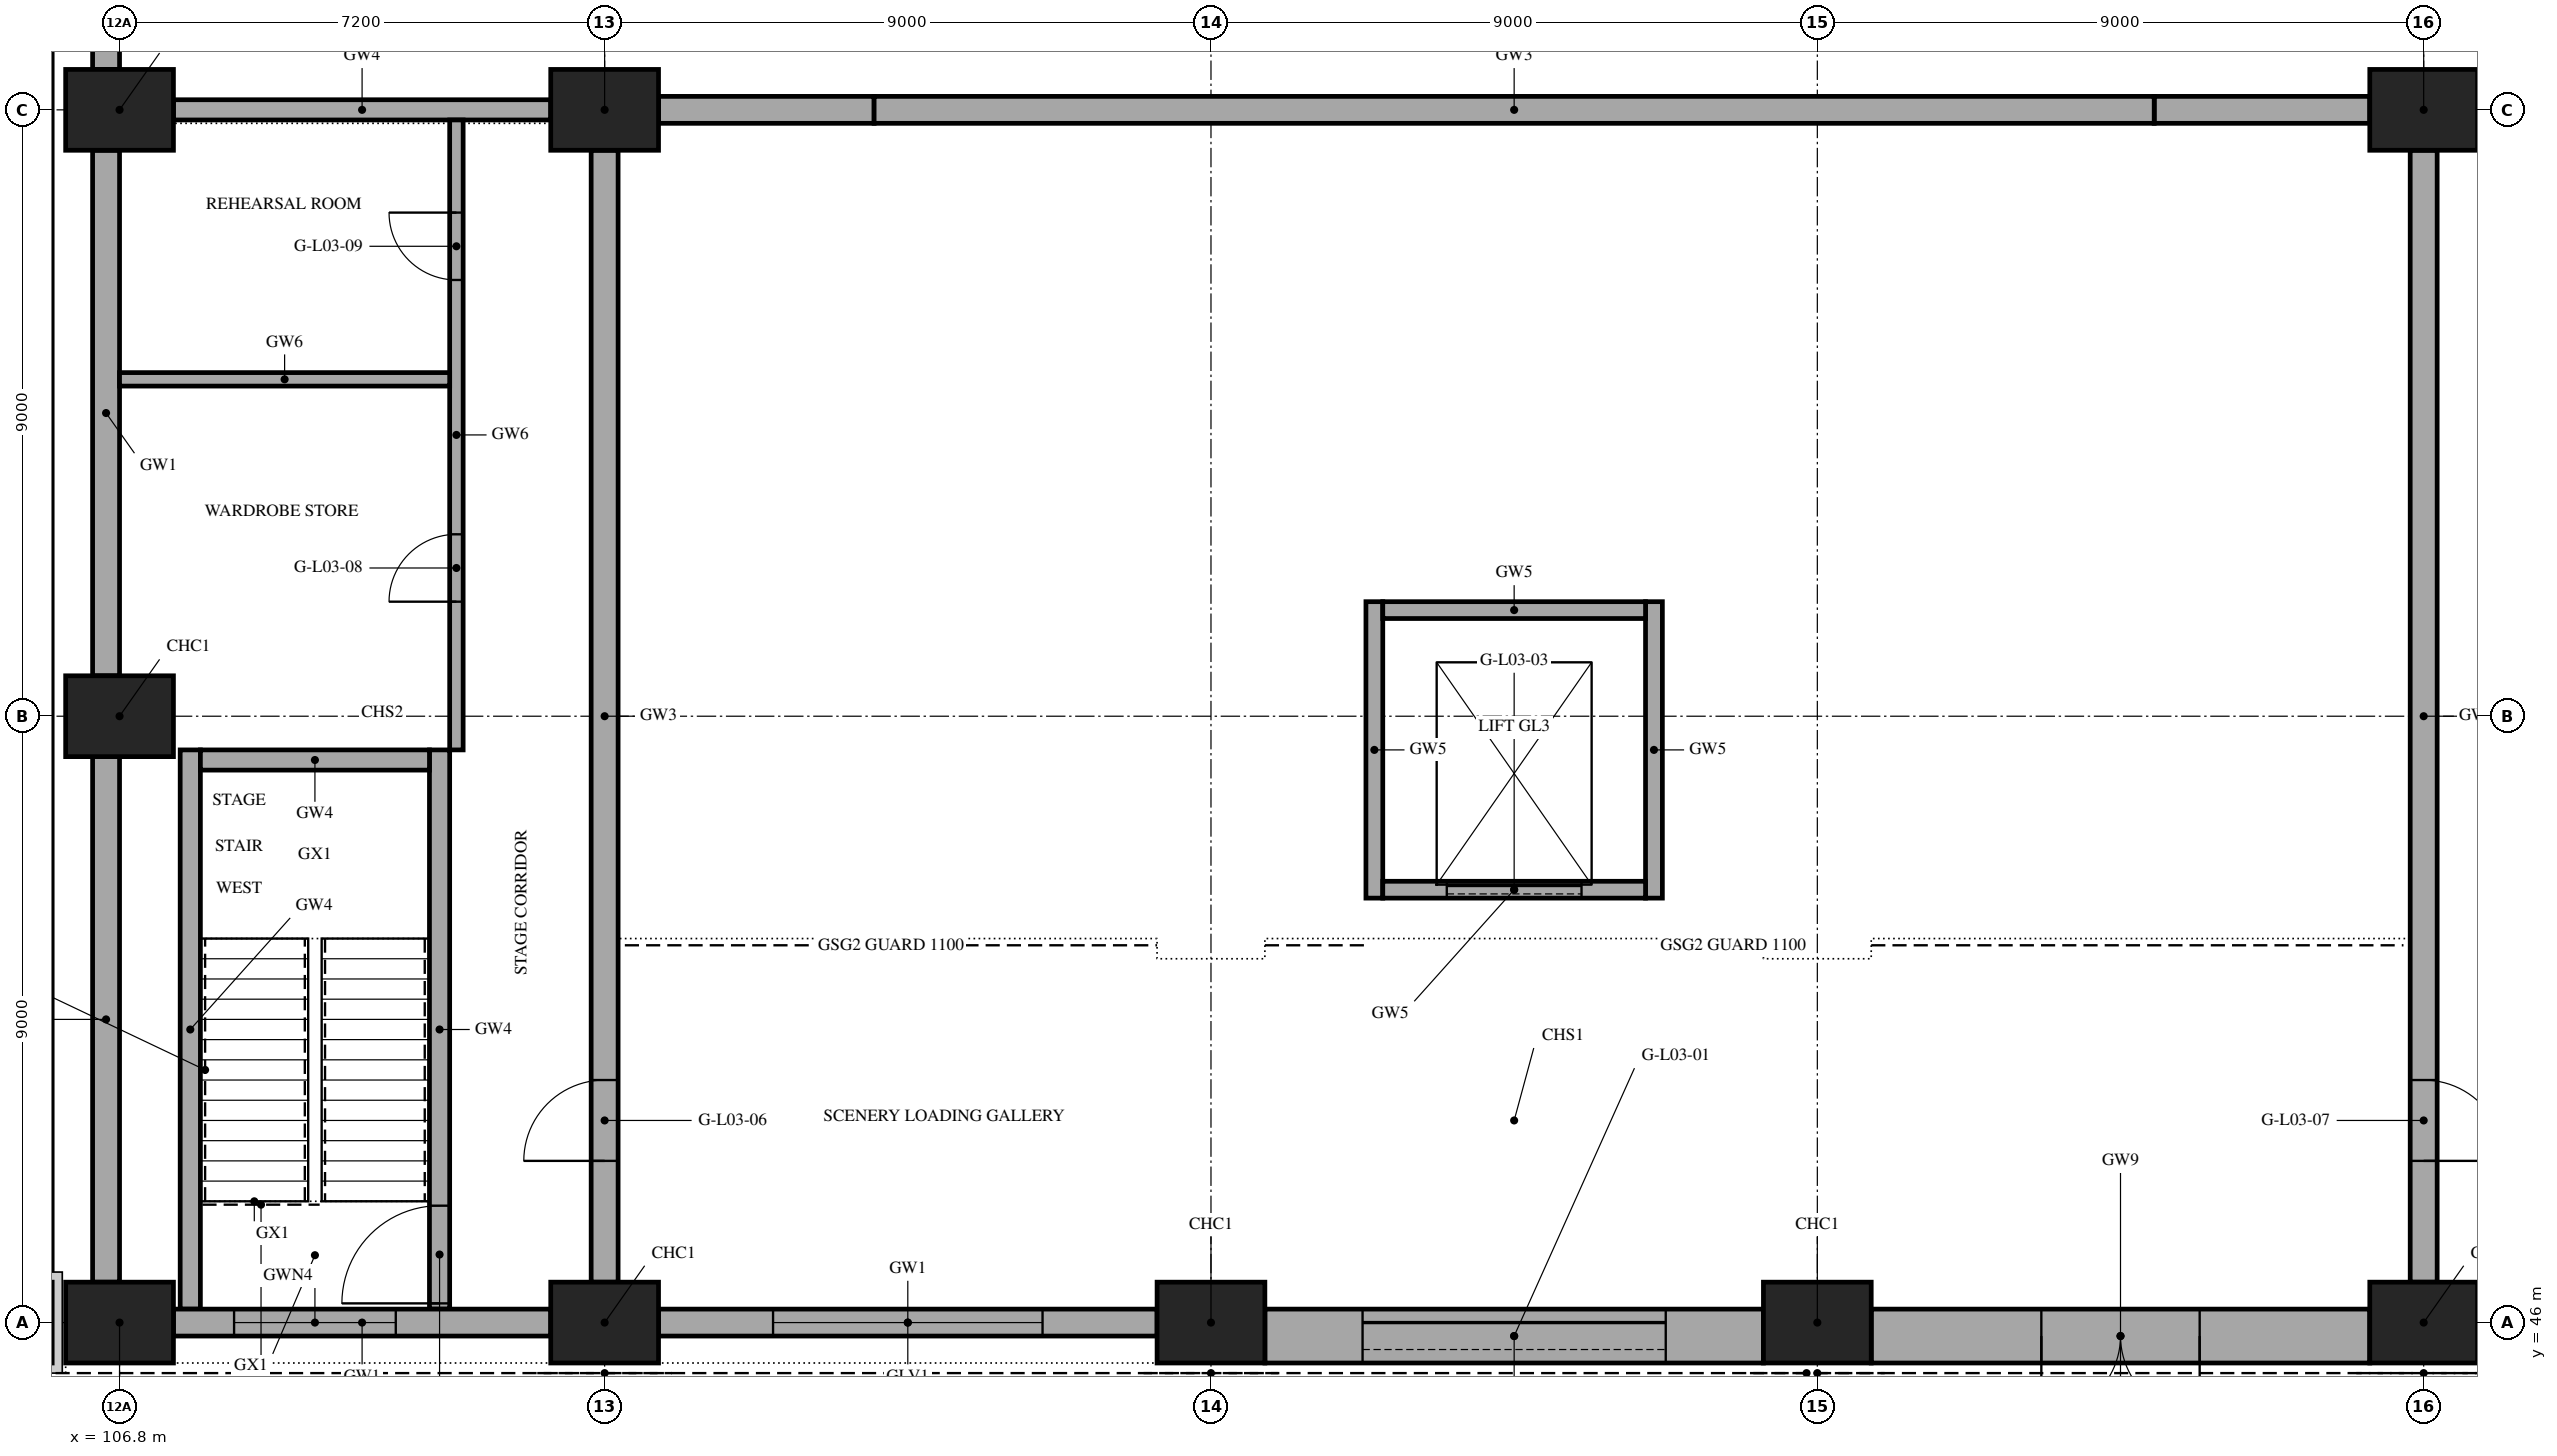
"""IFC4 building model, lengths in metres.
Left out: names, types, materials, properties, quantities, classifications, styles, units other than length and angle.
Written with IfcOpenShell. Run it as: python <this file> out.ifc"""

import sys

from ifc_helpers import new_model, si_unit, direction, frame, frame_2d, origin, origin_2d, place, context, subcontext, project, spatial, rectangle, extrude, element, fill, save


model = new_model("IFC4")
c1 = context("Model", 3, precision=1e-05, world=origin(), true_north=direction((0.0, 1.0)))
c2 = subcontext(c1, "Body", "Model", "MODEL_VIEW")
j1 = project(units=[si_unit("LENGTHUNIT", "METRE"), si_unit("PLANEANGLEUNIT", "RADIAN")], contexts=[c1])
p1 = place(None, origin())
s1 = spatial("IfcSite", under=j1, at=p1, CompositionType="ELEMENT")
p2 = place(p1, origin())
s2 = spatial("IfcBuilding", under=s1, at=p2, CompositionType="ELEMENT")
p3 = place(p2, frame((0.0, 0.0, 15.0)))
s3 = spatial("IfcBuildingStorey", under=s2, at=p3, CompositionType="ELEMENT", Elevation=15.0)
for number, where, z_axis, x_axis in (
    (1, (106.8, 46.0, 0.0), (0.0, 0.0, 1.0), (1.0, 0.0, 0.0)),
    (2, (114.0, 46.0, 0.0), (0.0, 0.0, 1.0), (1.0, 0.0, 0.0)),
    (3, (123.0, 46.0, 0.0), (0.0, 0.0, 1.0), (1.0, 0.0, 0.0)),
    (4, (132.0, 46.0, 0.0), (0.0, 0.0, 1.0), (1.0, 0.0, 0.0)),
    (5, (141.0, 46.0, 0.0), (0.0, 0.0, 1.0), (1.0, 0.0, 0.0)),
    (6, (106.8, 55.0, 0.0), (0.0, 0.0, 1.0), (1.0, 0.0, 0.0)),
    (7, (106.8, 64.0, 0.0), (0.0, 0.0, 1.0), (1.0, 0.0, 0.0)),
    (8, (114.0, 64.0, 0.0), (0.0, 0.0, 1.0), (1.0, 0.0, 0.0)),
    (9, (141.0, 64.0, 0.0), (0.0, 0.0, 1.0), (1.0, 0.0, 0.0)),
):
    element("IfcColumn", number, at=place(p3, frame(where, z_axis=z_axis, x_axis=x_axis)), inside=s3, PredefinedType="COLUMN", context=c2, shape_type="SweptSolid", body=[
        extrude(rectangle(XDim=1.6, YDim=1.2, at=origin_2d()), origin(), (0.0, 0.0, 1.0), 4.2),
    ])
p4 = place(p3, frame((114.0, 46.6, 0.0), z_axis=(0.0, 0.0, 1.0), x_axis=(0.0, 1.0, 0.0)))
e10 = element("IfcWall", 10, at=p4, inside=s3, PredefinedType="SHEAR", context=c2, shape_type="SweptSolid", body=[
    extrude(rectangle(XDim=16.8, YDim=0.4, at=frame_2d((8.4, 0.0))), origin(), (0.0, 0.0, 1.0), 4.2),
])
p5 = place(p4, frame((1.8, 0.0, 0.0)))
e11 = element("IfcOpeningElement", 11, at=p5, cuts=e10, PredefinedType="OPENING", context=c2, shape_type="SweptSolid", body=[
    extrude(rectangle(XDim=1.2, YDim=2.1, at=frame_2d((0.6, 1.05))), frame((0.0, 0.21, 0.0), z_axis=(0.0, -1.0, 0.0), x_axis=(1.0, 0.0, 0.0)), (0.0, 0.0, 1.0), 0.42),
])
p6 = place(p3, frame((141.0, 46.6, 0.0), z_axis=(0.0, 0.0, 1.0), x_axis=(0.0, 1.0, 0.0)))
e12 = element("IfcWall", 12, at=p6, inside=s3, PredefinedType="SHEAR", context=c2, shape_type="SweptSolid", body=[
    extrude(rectangle(XDim=16.8, YDim=0.4, at=frame_2d((8.4, 0.0))), origin(), (0.0, 0.0, 1.0), 4.2),
])
p7 = place(p6, frame((1.8, 0.0, 0.0)))
e13 = element("IfcOpeningElement", 13, at=p7, cuts=e12, PredefinedType="OPENING", context=c2, shape_type="SweptSolid", body=[
    extrude(rectangle(XDim=1.2, YDim=2.1, at=frame_2d((0.6, 1.05))), frame((0.0, 0.21, 0.0), z_axis=(0.0, -1.0, 0.0), x_axis=(1.0, 0.0, 0.0)), (0.0, 0.0, 1.0), 0.42),
])
for number, where, z_axis, x_axis in (
    (14, (114.8, 64.0, 0.0), (0.0, 0.0, 1.0), (1.0, 0.0, 0.0)),
    (15, (137.0, 64.0, 0.0), (0.0, 0.0, 1.0), (1.0, 0.0, 0.0)),
):
    element("IfcWall", number, at=place(p3, frame(where, z_axis=z_axis, x_axis=x_axis)), inside=s3, PredefinedType="SHEAR", context=c2, shape_type="SweptSolid", body=[
        extrude(rectangle(XDim=3.2, YDim=0.4, at=frame_2d((1.6, 0.0))), origin(), (0.0, 0.0, 1.0), 4.2),
    ])
p8 = place(p3, frame((118.0, 64.0, 0.0), z_axis=(0.0, 0.0, 1.0), x_axis=(1.0, 0.0, 0.0)))
e16 = element("IfcWall", 16, at=p8, inside=s3, PredefinedType="SHEAR", context=c2, shape_type="SweptSolid", body=[
    extrude(rectangle(XDim=19.0, YDim=0.4, at=frame_2d((9.5, 0.0))), origin(), (0.0, 0.0, 1.0), 4.2),
])
p9 = place(p3, frame((107.6, 64.0, 0.0), z_axis=(0.0, 0.0, 1.0), x_axis=(1.0, 0.0, 0.0)))
e17 = element("IfcWall", 17, at=p9, inside=s3, PredefinedType="SHEAR", context=c2, shape_type="SweptSolid", body=[
    extrude(rectangle(XDim=5.6, YDim=0.3, at=frame_2d((2.8, 0.0))), origin(), (0.0, 0.0, 1.0), 4.2),
])
p10 = place(p3, frame((107.85, 46.2, 0.0), z_axis=(0.0, 0.0, 1.0), x_axis=(0.0, 1.0, 0.0)))
e18 = element("IfcWall", 18, at=p10, inside=s3, PredefinedType="SHEAR", context=c2, shape_type="SweptSolid", body=[
    extrude(rectangle(XDim=8.3, YDim=0.3, at=frame_2d((4.15, 0.0))), origin(), (0.0, 0.0, 1.0), 4.2),
])
p11 = place(p3, frame((111.55, 46.2, 0.0), z_axis=(0.0, 0.0, 1.0), x_axis=(0.0, 1.0, 0.0)))
e19 = element("IfcWall", 19, at=p11, inside=s3, PredefinedType="SHEAR", context=c2, shape_type="SweptSolid", body=[
    extrude(rectangle(XDim=8.3, YDim=0.3, at=frame_2d((4.15, 0.0))), origin(), (0.0, 0.0, 1.0), 4.2),
])
p12 = place(p11, frame((0.085, 0.0, 0.0)))
e20 = element("IfcOpeningElement", 20, at=p12, cuts=e19, PredefinedType="OPENING", context=c2, shape_type="SweptSolid", body=[
    extrude(rectangle(XDim=1.45, YDim=2.1, at=frame_2d((0.725, 1.05))), frame((0.0, 0.16, 0.0), z_axis=(0.0, -1.0, 0.0), x_axis=(1.0, 0.0, 0.0)), (0.0, 0.0, 1.0), 0.32),
])
p13 = place(p3, frame((108.0, 54.35, 0.0), z_axis=(0.0, 0.0, 1.0), x_axis=(1.0, 0.0, 0.0)))
e21 = element("IfcWall", 21, at=p13, inside=s3, PredefinedType="SHEAR", context=c2, shape_type="SweptSolid", body=[
    extrude(rectangle(XDim=3.4, YDim=0.3, at=frame_2d((1.7, 0.0))), origin(), (0.0, 0.0, 1.0), 4.2),
])
for number, where, z_axis, x_axis in (
    (22, (125.425, 52.3, 0.0), (0.0, 0.0, 1.0), (0.0, 1.0, 0.0)),
    (23, (129.575, 52.3, 0.0), (0.0, 0.0, 1.0), (0.0, 1.0, 0.0)),
):
    element("IfcWall", number, at=place(p3, frame(where, z_axis=z_axis, x_axis=x_axis)), inside=s3, PredefinedType="SHEAR", context=c2, shape_type="SweptSolid", body=[
        extrude(rectangle(XDim=4.4, YDim=0.25, at=frame_2d((2.2, 0.0))), origin(), (0.0, 0.0, 1.0), 4.2),
    ])
p14 = place(p3, frame((125.55, 52.425, 0.0), z_axis=(0.0, 0.0, 1.0), x_axis=(1.0, 0.0, 0.0)))
e24 = element("IfcWall", 24, at=p14, inside=s3, PredefinedType="SHEAR", context=c2, shape_type="SweptSolid", body=[
    extrude(rectangle(XDim=3.9, YDim=0.25, at=frame_2d((1.95, 0.0))), origin(), (0.0, 0.0, 1.0), 4.2),
])
p15 = place(p14, frame((0.95, 0.0, 0.0)))
e25 = element("IfcOpeningElement", 25, at=p15, cuts=e24, PredefinedType="OPENING", context=c2, shape_type="SweptSolid", body=[
    extrude(rectangle(XDim=2.0, YDim=2.4, at=frame_2d((1.0, 1.2))), frame((0.0, 0.135, 0.0), z_axis=(0.0, -1.0, 0.0), x_axis=(1.0, 0.0, 0.0)), (0.0, 0.0, 1.0), 0.27),
])
p16 = place(p3, frame((125.55, 56.575, 0.0), z_axis=(0.0, 0.0, 1.0), x_axis=(1.0, 0.0, 0.0)))
e26 = element("IfcWall", 26, at=p16, inside=s3, PredefinedType="SHEAR", context=c2, shape_type="SweptSolid", body=[
    extrude(rectangle(XDim=3.9, YDim=0.25, at=frame_2d((1.95, 0.0))), origin(), (0.0, 0.0, 1.0), 4.2),
])
for number, where, z_axis, x_axis in (
    (27, (106.6, 46.6, 0.0), (0.0, 0.0, 1.0), (0.0, 1.0, 0.0)),
    (28, (106.6, 55.6, 0.0), (0.0, 0.0, 1.0), (0.0, 1.0, 0.0)),
    (29, (106.6, 64.6, 0.0), (0.0, 0.0, 1.0), (0.0, 1.0, 0.0)),
):
    element("IfcWall", number, at=place(p3, frame(where, z_axis=z_axis, x_axis=x_axis)), inside=s3, PredefinedType="SOLIDWALL", context=c2, shape_type="SweptSolid", body=[
        extrude(rectangle(XDim=7.8, YDim=0.4, at=frame_2d((3.9, 0.0))), origin(), (0.0, 0.0, 1.0), 4.2),
    ])
p17 = place(p3, frame((107.6, 46.0, 0.0), z_axis=(0.0, 0.0, 1.0), x_axis=(1.0, 0.0, 0.0)))
e30 = element("IfcWall", 30, at=p17, inside=s3, PredefinedType="SOLIDWALL", context=c2, shape_type="SweptSolid", body=[
    extrude(rectangle(XDim=5.6, YDim=0.4, at=frame_2d((2.8, 0.0))), origin(), (0.0, 0.0, 1.0), 4.2),
])
p18 = place(p17, frame((0.9, 0.0, 1.2)))
e31 = element("IfcOpeningElement", 31, at=p18, cuts=e30, PredefinedType="OPENING", context=c2, shape_type="SweptSolid", body=[
    extrude(rectangle(XDim=2.4, YDim=1.8, at=frame_2d((1.2, 0.9))), frame((0.0, 0.21, 0.0), z_axis=(0.0, -1.0, 0.0), x_axis=(1.0, 0.0, 0.0)), (0.0, 0.0, 1.0), 0.42),
])
p19 = place(p3, frame((114.8, 46.0, 0.0), z_axis=(0.0, 0.0, 1.0), x_axis=(1.0, 0.0, 0.0)))
e32 = element("IfcWall", 32, at=p19, inside=s3, PredefinedType="SOLIDWALL", context=c2, shape_type="SweptSolid", body=[
    extrude(rectangle(XDim=7.4, YDim=0.4, at=frame_2d((3.7, 0.0))), origin(), (0.0, 0.0, 1.0), 4.2),
])
p20 = place(p19, frame((1.7, 0.0, 0.6)))
e33 = element("IfcOpeningElement", 33, at=p20, cuts=e32, PredefinedType="OPENING", context=c2, shape_type="SweptSolid", body=[
    extrude(rectangle(XDim=4.0, YDim=2.4, at=frame_2d((2.0, 1.2))), frame((0.0, 0.21, 0.0), z_axis=(0.0, -1.0, 0.0), x_axis=(1.0, 0.0, 0.0)), (0.0, 0.0, 1.0), 0.42),
])
p21 = place(p3, frame((123.8, 45.8, 0.0), z_axis=(0.0, 0.0, 1.0), x_axis=(1.0, 0.0, 0.0)))
e34 = element("IfcWall", 34, at=p21, inside=s3, PredefinedType="SOLIDWALL", context=c2, shape_type="SweptSolid", body=[
    extrude(rectangle(XDim=7.4, YDim=0.8, at=frame_2d((3.7, 0.0))), origin(), (0.0, 0.0, 1.0), 3.6),
])
p22 = place(p21, frame((1.45, 0.0, 0.0)))
e35 = element("IfcOpeningElement", 35, at=p22, cuts=e34, PredefinedType="OPENING", context=c2, shape_type="SweptSolid", body=[
    extrude(rectangle(XDim=4.5, YDim=3.5, at=frame_2d((2.25, 1.75))), frame((0.0, 0.41, 0.0), z_axis=(0.0, -1.0, 0.0), x_axis=(1.0, 0.0, 0.0)), (0.0, 0.0, 1.0), 0.82),
])
p23 = place(p3, frame((132.8, 45.8, 0.0), z_axis=(0.0, 0.0, 1.0), x_axis=(1.0, 0.0, 0.0)))
e36 = element("IfcWall", 36, at=p23, inside=s3, PredefinedType="SOLIDWALL", context=c2, shape_type="SweptSolid", body=[
    extrude(rectangle(XDim=7.4, YDim=0.8, at=frame_2d((3.7, 0.0))), origin(), (0.0, 0.0, 1.0), 3.6),
])
p24 = place(p23, frame((2.525, 0.0, 0.0)))
e37 = element("IfcOpeningElement", 37, at=p24, cuts=e36, PredefinedType="OPENING", context=c2, shape_type="SweptSolid", body=[
    extrude(rectangle(XDim=2.35, YDim=2.4, at=frame_2d((1.175, 1.2))), frame((0.0, 0.41, 0.0), z_axis=(0.0, -1.0, 0.0), x_axis=(1.0, 0.0, 0.0)), (0.0, 0.0, 1.0), 0.82),
])
p25 = place(p3, frame((111.8, 54.5, 0.0), z_axis=(0.0, 0.0, 1.0), x_axis=(0.0, 1.0, 0.0)))
e38 = element("IfcWall", 38, at=p25, inside=s3, PredefinedType="PARTITIONING", context=c2, shape_type="SweptSolid", body=[
    extrude(rectangle(XDim=9.35, YDim=0.2, at=frame_2d((4.675, 0.0))), origin(), (0.0, 0.0, 1.0), 3.9),
])
p26 = place(p25, frame((2.2, 0.0, 0.0)))
e39 = element("IfcOpeningElement", 39, at=p26, cuts=e38, PredefinedType="OPENING", context=c2, shape_type="SweptSolid", body=[
    extrude(rectangle(XDim=1.0, YDim=2.1, at=frame_2d((0.5, 1.05))), frame((0.0, 0.11, 0.0), z_axis=(0.0, -1.0, 0.0), x_axis=(1.0, 0.0, 0.0)), (0.0, 0.0, 1.0), 0.22),
])
p27 = place(p25, frame((6.975, 0.0, 0.0)))
e40 = element("IfcOpeningElement", 40, at=p27, cuts=e38, PredefinedType="OPENING", context=c2, shape_type="SweptSolid", body=[
    extrude(rectangle(XDim=1.0, YDim=2.1, at=frame_2d((0.5, 1.05))), frame((0.0, 0.11, 0.0), z_axis=(0.0, -1.0, 0.0), x_axis=(1.0, 0.0, 0.0)), (0.0, 0.0, 1.0), 0.22),
])
p28 = place(p3, frame((106.8, 60.0, 0.0), z_axis=(0.0, 0.0, 1.0), x_axis=(1.0, 0.0, 0.0)))
e41 = element("IfcWall", 41, at=p28, inside=s3, PredefinedType="PARTITIONING", context=c2, shape_type="SweptSolid", body=[
    extrude(rectangle(XDim=4.9, YDim=0.2, at=frame_2d((2.45, 0.0))), origin(), (0.0, 0.0, 1.0), 3.9),
])
p29 = place(p18, origin())
e42 = element("IfcWindow", 42, at=p29, inside=s3, PartitioningType="SINGLE_PANEL", PredefinedType="WINDOW", context=c2, shape_type="SweptSolid", body=[
    extrude(rectangle(XDim=2.4, YDim=1.8, at=frame_2d((1.2, 0.9))), frame((0.0, 0.03, 0.0), z_axis=(0.0, -1.0, 0.0), x_axis=(1.0, 0.0, 0.0)), (0.0, 0.0, 1.0), 0.06),
])
fill(e31, e42)
p30 = place(p20, origin())
e43 = element("IfcWindow", 43, at=p30, inside=s3, PartitioningType="SINGLE_PANEL", PredefinedType="USERDEFINED", context=c2, shape_type="SweptSolid", body=[
    extrude(rectangle(XDim=4.0, YDim=2.4, at=frame_2d((2.0, 1.2))), frame((0.0, 0.03, 0.0), z_axis=(0.0, -1.0, 0.0), x_axis=(1.0, 0.0, 0.0)), (0.0, 0.0, 1.0), 0.06),
])
fill(e33, e43)
p31 = place(p22, frame((4.5, 0.0, 0.0), z_axis=(0.0, 0.0, 1.0), x_axis=(-1.0, 0.0, 0.0)))
e44 = element("IfcDoor", 44, at=p31, inside=s3, OperationType="ROLLINGUP", PredefinedType="DOOR", context=c2, shape_type="SweptSolid", body=[
    extrude(rectangle(XDim=4.5, YDim=3.5, at=frame_2d((2.25, 1.75))), frame((0.0, 0.025, 0.0), z_axis=(0.0, -1.0, 0.0), x_axis=(1.0, 0.0, 0.0)), (0.0, 0.0, 1.0), 0.05),
])
fill(e35, e44)
p32 = place(p24, frame((2.35, 0.0, 0.0), z_axis=(0.0, 0.0, 1.0), x_axis=(-1.0, 0.0, 0.0)))
e45 = element("IfcDoor", 45, at=p32, inside=s3, OperationType="DOUBLE_DOOR_SINGLE_SWING", PredefinedType="DOOR", context=c2, shape_type="SweptSolid", body=[
    extrude(rectangle(XDim=2.35, YDim=2.4, at=frame_2d((1.175, 1.2))), frame((0.0, 0.025, 0.0), z_axis=(0.0, -1.0, 0.0), x_axis=(1.0, 0.0, 0.0)), (0.0, 0.0, 1.0), 0.05),
])
fill(e37, e45)
p33 = place(p15, origin())
e46 = element("IfcDoor", 46, at=p33, inside=s3, OperationType="SLIDING_TO_LEFT", PredefinedType="DOOR", context=c2, shape_type="SweptSolid", body=[
    extrude(rectangle(XDim=2.0, YDim=2.4, at=frame_2d((1.0, 1.2))), frame((0.0, 0.025, 0.0), z_axis=(0.0, -1.0, 0.0), x_axis=(1.0, 0.0, 0.0)), (0.0, 0.0, 1.0), 0.05),
])
fill(e25, e46)
p34 = place(p12, origin())
e47 = element("IfcDoor", 47, at=p34, inside=s3, OperationType="SINGLE_SWING_LEFT", PredefinedType="DOOR", context=c2, shape_type="SweptSolid", body=[
    extrude(rectangle(XDim=1.45, YDim=2.1, at=frame_2d((0.725, 1.05))), frame((0.0, 0.025, 0.0), z_axis=(0.0, -1.0, 0.0), x_axis=(1.0, 0.0, 0.0)), (0.0, 0.0, 1.0), 0.05),
])
fill(e20, e47)
p35 = place(p5, origin())
e48 = element("IfcDoor", 48, at=p35, inside=s3, OperationType="SINGLE_SWING_LEFT", PredefinedType="DOOR", context=c2, shape_type="SweptSolid", body=[
    extrude(rectangle(XDim=1.2, YDim=2.1, at=frame_2d((0.6, 1.05))), frame((0.0, 0.025, 0.0), z_axis=(0.0, -1.0, 0.0), x_axis=(1.0, 0.0, 0.0)), (0.0, 0.0, 1.0), 0.05),
])
fill(e11, e48)
p36 = place(p7, frame((1.2, 0.0, 0.0), z_axis=(0.0, 0.0, 1.0), x_axis=(-1.0, 0.0, 0.0)))
e49 = element("IfcDoor", 49, at=p36, inside=s3, OperationType="SINGLE_SWING_RIGHT", PredefinedType="DOOR", context=c2, shape_type="SweptSolid", body=[
    extrude(rectangle(XDim=1.2, YDim=2.1, at=frame_2d((0.6, 1.05))), frame((0.0, 0.025, 0.0), z_axis=(0.0, -1.0, 0.0), x_axis=(1.0, 0.0, 0.0)), (0.0, 0.0, 1.0), 0.05),
])
fill(e13, e49)
p37 = place(p26, origin())
e50 = element("IfcDoor", 50, at=p37, inside=s3, OperationType="SINGLE_SWING_LEFT", PredefinedType="DOOR", context=c2, shape_type="SweptSolid", body=[
    extrude(rectangle(XDim=1.0, YDim=2.1, at=frame_2d((0.5, 1.05))), frame((0.0, 0.025, 0.0), z_axis=(0.0, -1.0, 0.0), x_axis=(1.0, 0.0, 0.0)), (0.0, 0.0, 1.0), 0.05),
])
fill(e39, e50)
p38 = place(p27, origin())
e51 = element("IfcDoor", 51, at=p38, inside=s3, OperationType="SINGLE_SWING_RIGHT", PredefinedType="DOOR", context=c2, shape_type="SweptSolid", body=[
    extrude(rectangle(XDim=1.0, YDim=2.1, at=frame_2d((0.5, 1.05))), frame((0.0, 0.025, 0.0), z_axis=(0.0, -1.0, 0.0), x_axis=(1.0, 0.0, 0.0)), (0.0, 0.0, 1.0), 0.05),
])
fill(e40, e51)
save(model, sys.argv[1])
